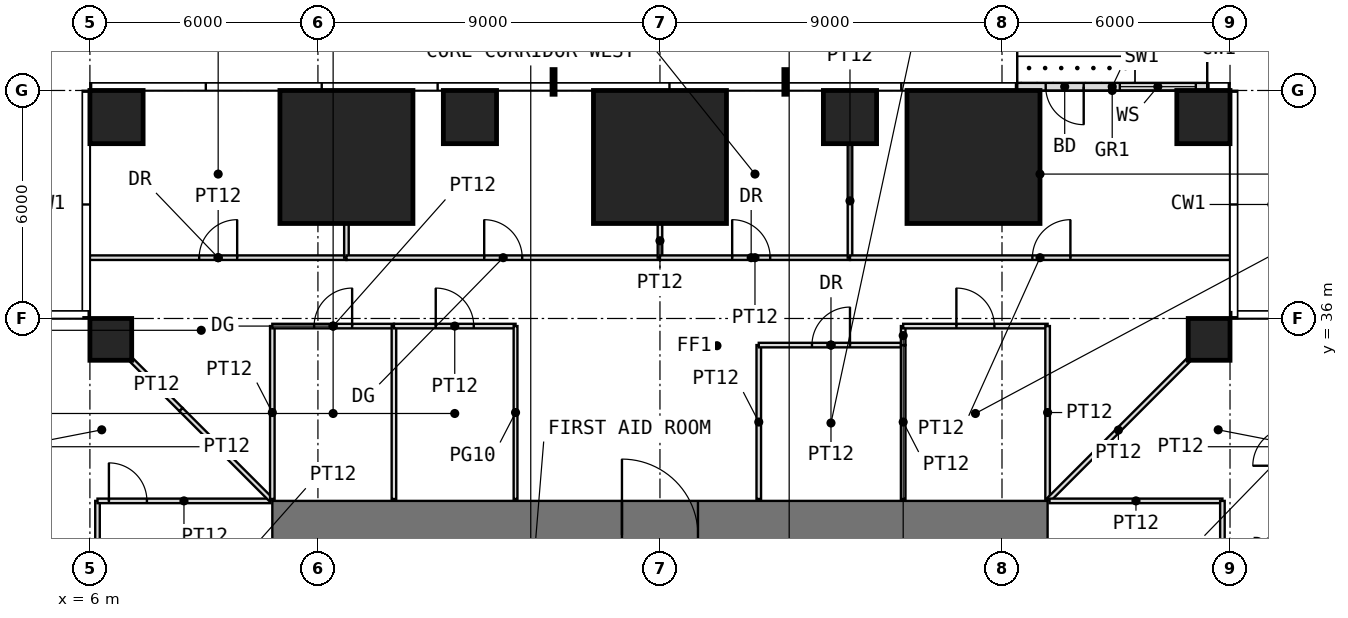
"""IFC4 building model, lengths in metres.
Left out: names, types, materials, properties, quantities, classifications, styles, units other than length and angle.
Written with IfcOpenShell. Run it as: python <this file> out.ifc"""

import sys

from ifc_helpers import new_model, si_unit, direction, frame, frame_2d, origin, origin_2d, place, context, subcontext, project, spatial, rectangle, extrude, element, fill, save


model = new_model("IFC4")
c1 = context("Model", 3, precision=1e-05, world=origin(), true_north=direction((0.0, 1.0)))
c2 = subcontext(c1, "Body", "Model", "MODEL_VIEW")
j1 = project(units=[si_unit("LENGTHUNIT", "METRE"), si_unit("PLANEANGLEUNIT", "RADIAN")], contexts=[c1])
p1 = place(None, origin())
s1 = spatial("IfcSite", under=j1, at=p1, CompositionType="ELEMENT")
p2 = place(p1, origin())
s2 = spatial("IfcBuilding", under=s1, at=p2, CompositionType="ELEMENT")
p3 = place(p2, frame((0.0, 0.0, 78.5)))
s3 = spatial("IfcBuildingStorey", under=s2, at=p3, CompositionType="ELEMENT", Elevation=78.5)
for number, where, z_axis, x_axis in (
    (1, (6.55, 35.45, 0.0), (0.0, 0.0, 1.0), (1.0, 0.0, 0.0)),
    (2, (35.45, 35.45, 0.0), (0.0, 0.0, 1.0), (1.0, 0.0, 0.0)),
):
    element("IfcColumn", number, at=place(p3, frame(where, z_axis=z_axis, x_axis=x_axis)), inside=s3, PredefinedType="COLUMN", context=c2, shape_type="SweptSolid", body=[
        extrude(rectangle(XDim=1.1, YDim=1.1, at=origin_2d()), origin(), (0.0, 0.0, 1.0), 4.0),
    ])
p4 = place(p3, frame((6.7, 41.3, 0.0), z_axis=(0.0, 0.0, 1.0), x_axis=(1.0, 0.0, 0.0)))
e3 = element("IfcColumn", 3, at=p4, inside=s3, PredefinedType="COLUMN", context=c2, shape_type="SweptSolid", body=[
    extrude(rectangle(XDim=1.4, YDim=1.4, at=origin_2d()), origin(), (0.0, 0.0, 1.0), 4.0),
])
p5 = place(p3, frame((12.75, 40.25, 0.0), z_axis=(0.0, 0.0, 1.0), x_axis=(1.0, 0.0, 0.0)))
e4 = element("IfcColumn", 4, at=p5, inside=s3, PredefinedType="COLUMN", context=c2, shape_type="SweptSolid", body=[
    extrude(rectangle(XDim=3.5, YDim=3.5, at=origin_2d()), origin(), (0.0, 0.0, 1.0), 4.0),
])
p6 = place(p3, frame((16.0, 41.3, 0.0), z_axis=(0.0, 0.0, 1.0), x_axis=(1.0, 0.0, 0.0)))
e5 = element("IfcColumn", 5, at=p6, inside=s3, PredefinedType="COLUMN", context=c2, shape_type="SweptSolid", body=[
    extrude(rectangle(XDim=1.4, YDim=1.4, at=origin_2d()), origin(), (0.0, 0.0, 1.0), 4.0),
])
p7 = place(p3, frame((21.0, 40.25, 0.0), z_axis=(0.0, 0.0, 1.0), x_axis=(1.0, 0.0, 0.0)))
e6 = element("IfcColumn", 6, at=p7, inside=s3, PredefinedType="COLUMN", context=c2, shape_type="SweptSolid", body=[
    extrude(rectangle(XDim=3.5, YDim=3.5, at=origin_2d()), origin(), (0.0, 0.0, 1.0), 4.0),
])
p8 = place(p3, frame((26.0, 41.3, 0.0), z_axis=(0.0, 0.0, 1.0), x_axis=(1.0, 0.0, 0.0)))
e7 = element("IfcColumn", 7, at=p8, inside=s3, PredefinedType="COLUMN", context=c2, shape_type="SweptSolid", body=[
    extrude(rectangle(XDim=1.4, YDim=1.4, at=origin_2d()), origin(), (0.0, 0.0, 1.0), 4.0),
])
p9 = place(p3, frame((29.25, 40.25, 0.0), z_axis=(0.0, 0.0, 1.0), x_axis=(1.0, 0.0, 0.0)))
e8 = element("IfcColumn", 8, at=p9, inside=s3, PredefinedType="COLUMN", context=c2, shape_type="SweptSolid", body=[
    extrude(rectangle(XDim=3.5, YDim=3.5, at=origin_2d()), origin(), (0.0, 0.0, 1.0), 4.0),
])
p10 = place(p3, frame((35.3, 41.3, 0.0), z_axis=(0.0, 0.0, 1.0), x_axis=(1.0, 0.0, 0.0)))
e9 = element("IfcColumn", 9, at=p10, inside=s3, PredefinedType="COLUMN", context=c2, shape_type="SweptSolid", body=[
    extrude(rectangle(XDim=1.4, YDim=1.4, at=origin_2d()), origin(), (0.0, 0.0, 1.0), 4.0),
])
p11 = place(p3, frame((35.4, 42.1, 0.0), z_axis=(0.0, 0.0, 1.0), x_axis=(-1.0, 0.0, 0.0)))
e10 = element("IfcWall", 10, at=p11, inside=s3, PredefinedType="USERDEFINED", context=c2, shape_type="SweptSolid", body=[
    extrude(rectangle(XDim=5.0, YDim=0.2, at=frame_2d((2.5, 0.0))), origin(), (0.0, 0.0, 1.0), 3.75),
])
p12 = place(p11, frame((3.25, 0.0, 0.0)))
e11 = element("IfcOpeningElement", 11, at=p12, cuts=e10, PredefinedType="OPENING", context=c2, shape_type="SweptSolid", body=[
    extrude(rectangle(XDim=1.0, YDim=2.4, at=frame_2d((0.5, 1.2))), frame((0.0, 0.11, 0.0), z_axis=(0.0, -1.0, 0.0), x_axis=(1.0, 0.0, 0.0)), (0.0, 0.0, 1.0), 0.22),
])
p13 = place(p11, frame((0.3, 0.0, 0.3)))
e12 = element("IfcOpeningElement", 12, at=p13, cuts=e10, PredefinedType="OPENING", context=c2, shape_type="SweptSolid", body=[
    extrude(rectangle(XDim=2.0, YDim=2.7, at=frame_2d((1.0, 1.35))), frame((0.0, 0.11, 0.0), z_axis=(0.0, -1.0, 0.0), x_axis=(1.0, 0.0, 0.0)), (0.0, 0.0, 1.0), 0.22),
])
p14 = place(p3, frame((10.8, 30.3, -0.05), z_axis=(0.0, 0.0, 1.0), x_axis=(1.0, 0.0, 0.0)))
e13 = element("IfcWall", 13, at=p14, inside=s3, PredefinedType="SHEAR", context=c2, shape_type="SweptSolid", body=[
    extrude(rectangle(XDim=20.4, YDim=1.8, at=frame_2d((10.2, 0.0))), origin(), (0.0, 0.0, 1.0), 4.0),
])
p15 = place(p14, frame((9.2, 0.0, 0.05)))
e14 = element("IfcOpeningElement", 14, at=p15, cuts=e13, PredefinedType="OPENING", context=c2, shape_type="SweptSolid", body=[
    extrude(rectangle(XDim=2.0, YDim=2.2, at=frame_2d((1.0, 1.1))), frame((0.0, 0.91, 0.0), z_axis=(0.0, -1.0, 0.0), x_axis=(1.0, 0.0, 0.0)), (0.0, 0.0, 1.0), 1.82),
])
p16 = place(p3, frame((6.0, 37.6, 0.0), z_axis=(0.0, 0.0, 1.0), x_axis=(1.0, 0.0, 0.0)))
e15 = element("IfcWall", 15, at=p16, inside=s3, PredefinedType="PARTITIONING", context=c2, shape_type="SweptSolid", body=[
    extrude(rectangle(XDim=6.75, YDim=0.12, at=frame_2d((3.375, 0.0))), origin(), (0.0, 0.0, 1.0), 3.75),
])
p17 = place(p16, frame((2.875, 0.0, 0.0)))
e16 = element("IfcOpeningElement", 16, at=p17, cuts=e15, PredefinedType="OPENING", context=c2, shape_type="SweptSolid", body=[
    extrude(rectangle(XDim=1.0, YDim=2.2, at=frame_2d((0.5, 1.1))), frame((0.0, 0.07, 0.0), z_axis=(0.0, -1.0, 0.0), x_axis=(1.0, 0.0, 0.0)), (0.0, 0.0, 1.0), 0.14),
])
p18 = place(p3, frame((6.2, 28.2, 0.0), z_axis=(0.0, 0.0, 1.0), x_axis=(0.0, 1.0, 0.0)))
e17 = element("IfcWall", 17, at=p18, inside=s3, PredefinedType="PARTITIONING", context=c2, shape_type="SweptSolid", body=[
    extrude(rectangle(XDim=3.0, YDim=0.12, at=frame_2d((1.5, 0.0))), origin(), (0.0, 0.0, 1.0), 3.75),
])
p19 = place(p3, frame((6.2, 31.2, 0.0), z_axis=(0.0, 0.0, 1.0), x_axis=(1.0, 0.0, 0.0)))
e18 = element("IfcWall", 18, at=p19, inside=s3, PredefinedType="PARTITIONING", context=c2, shape_type="SweptSolid", body=[
    extrude(rectangle(XDim=4.55, YDim=0.12, at=frame_2d((2.275, 0.0))), origin(), (0.0, 0.0, 1.0), 3.75),
])
p20 = place(p19, frame((0.3, 0.0, 0.0)))
e19 = element("IfcOpeningElement", 19, at=p20, cuts=e18, PredefinedType="OPENING", context=c2, shape_type="SweptSolid", body=[
    extrude(rectangle(XDim=1.0, YDim=2.4, at=frame_2d((0.5, 1.2))), frame((0.0, 0.07, 0.0), z_axis=(0.0, -1.0, 0.0), x_axis=(1.0, 0.0, 0.0)), (0.0, 0.0, 1.0), 0.14),
])
p21 = place(p3, frame((7.11, 34.89, 0.0), z_axis=(0.0, 0.0, 1.0), x_axis=(0.707106781187, -0.707106781187, 0.0)))
e20 = element("IfcWall", 20, at=p21, inside=s3, PredefinedType="PARTITIONING", context=c2, shape_type="SweptSolid", body=[
    extrude(rectangle(XDim=1.822, YDim=0.12, at=frame_2d((0.911, 0.0))), origin(), (0.0, 0.0, 1.0), 3.75),
])
p22 = place(p3, frame((8.398, 33.602, 0.0), z_axis=(0.0, 0.0, 1.0), x_axis=(0.707106781187, -0.707106781187, 0.0)))
e21 = element("IfcWall", 21, at=p22, inside=s3, PredefinedType="PARTITIONING", context=c2, shape_type="SweptSolid", body=[
    extrude(rectangle(XDim=3.346, YDim=0.12, at=frame_2d((1.673, 0.0))), origin(), (0.0, 0.0, 1.0), 3.75),
])
p23 = place(p3, frame((10.8, 31.25, 0.0), z_axis=(0.0, 0.0, 1.0), x_axis=(0.0, 1.0, 0.0)))
e22 = element("IfcWall", 22, at=p23, inside=s3, PredefinedType="PARTITIONING", context=c2, shape_type="SweptSolid", body=[
    extrude(rectangle(XDim=4.55, YDim=0.12, at=frame_2d((2.275, 0.0))), origin(), (0.0, 0.0, 1.0), 3.75),
])
p24 = place(p3, frame((10.8, 35.8, 0.0), z_axis=(0.0, 0.0, 1.0), x_axis=(1.0, 0.0, 0.0)))
e23 = element("IfcWall", 23, at=p24, inside=s3, PredefinedType="PARTITIONING", context=c2, shape_type="SweptSolid", body=[
    extrude(rectangle(XDim=3.2, YDim=0.12, at=frame_2d((1.6, 0.0))), origin(), (0.0, 0.0, 1.0), 3.75),
])
p25 = place(p24, frame((1.1, 0.0, 0.0)))
e24 = element("IfcOpeningElement", 24, at=p25, cuts=e23, PredefinedType="OPENING", context=c2, shape_type="SweptSolid", body=[
    extrude(rectangle(XDim=1.0, YDim=2.4, at=frame_2d((0.5, 1.2))), frame((0.0, 0.07, 0.0), z_axis=(0.0, -1.0, 0.0), x_axis=(1.0, 0.0, 0.0)), (0.0, 0.0, 1.0), 0.14),
])
p26 = place(p3, frame((12.75, 37.6, 0.0), z_axis=(0.0, 0.0, 1.0), x_axis=(0.0, 1.0, 0.0)))
e25 = element("IfcWall", 25, at=p26, inside=s3, PredefinedType="PARTITIONING", context=c2, shape_type="SweptSolid", body=[
    extrude(rectangle(XDim=0.89, YDim=0.12, at=frame_2d((0.445, 0.0))), origin(), (0.0, 0.0, 1.0), 3.75),
])
p27 = place(p3, frame((12.75, 37.6, 0.0), z_axis=(0.0, 0.0, 1.0), x_axis=(1.0, 0.0, 0.0)))
e26 = element("IfcWall", 26, at=p27, inside=s3, PredefinedType="PARTITIONING", context=c2, shape_type="SweptSolid", body=[
    extrude(rectangle(XDim=8.25, YDim=0.12, at=frame_2d((4.125, 0.0))), origin(), (0.0, 0.0, 1.0), 3.75),
])
p28 = place(p27, frame((3.625, 0.0, 0.0)))
e27 = element("IfcOpeningElement", 27, at=p28, cuts=e26, PredefinedType="OPENING", context=c2, shape_type="SweptSolid", body=[
    extrude(rectangle(XDim=1.0, YDim=2.4, at=frame_2d((0.5, 1.2))), frame((0.0, 0.07, 0.0), z_axis=(0.0, -1.0, 0.0), x_axis=(1.0, 0.0, 0.0)), (0.0, 0.0, 1.0), 0.14),
])
p29 = place(p3, frame((14.0, 31.25, 0.0), z_axis=(0.0, 0.0, 1.0), x_axis=(0.0, 1.0, 0.0)))
e28 = element("IfcWall", 28, at=p29, inside=s3, PredefinedType="PARTITIONING", context=c2, shape_type="SweptSolid", body=[
    extrude(rectangle(XDim=4.55, YDim=0.12, at=frame_2d((2.275, 0.0))), origin(), (0.0, 0.0, 1.0), 3.75),
])
p30 = place(p3, frame((14.0, 35.8, 0.0), z_axis=(0.0, 0.0, 1.0), x_axis=(1.0, 0.0, 0.0)))
e29 = element("IfcWall", 29, at=p30, inside=s3, PredefinedType="PARTITIONING", context=c2, shape_type="SweptSolid", body=[
    extrude(rectangle(XDim=3.2, YDim=0.12, at=frame_2d((1.6, 0.0))), origin(), (0.0, 0.0, 1.0), 3.75),
])
p31 = place(p30, frame((1.1, 0.0, 0.0)))
e30 = element("IfcOpeningElement", 30, at=p31, cuts=e29, PredefinedType="OPENING", context=c2, shape_type="SweptSolid", body=[
    extrude(rectangle(XDim=1.0, YDim=2.4, at=frame_2d((0.5, 1.2))), frame((0.0, 0.07, 0.0), z_axis=(0.0, -1.0, 0.0), x_axis=(1.0, 0.0, 0.0)), (0.0, 0.0, 1.0), 0.14),
])
p32 = place(p3, frame((17.2, 31.25, 0.0), z_axis=(0.0, 0.0, 1.0), x_axis=(0.0, 1.0, 0.0)))
e31 = element("IfcWall", 31, at=p32, inside=s3, PredefinedType="PARTITIONING", context=c2, shape_type="SweptSolid", body=[
    extrude(rectangle(XDim=4.55, YDim=0.1, at=frame_2d((2.275, 0.0))), origin(), (0.0, 0.0, 1.0), 3.75),
])
p33 = place(p3, frame((21.0, 37.6, 0.0), z_axis=(0.0, 0.0, 1.0), x_axis=(0.0, 1.0, 0.0)))
e32 = element("IfcWall", 32, at=p33, inside=s3, PredefinedType="PARTITIONING", context=c2, shape_type="SweptSolid", body=[
    extrude(rectangle(XDim=0.89, YDim=0.12, at=frame_2d((0.445, 0.0))), origin(), (0.0, 0.0, 1.0), 3.75),
])
p34 = place(p3, frame((21.0, 37.6, 0.0), z_axis=(0.0, 0.0, 1.0), x_axis=(1.0, 0.0, 0.0)))
e33 = element("IfcWall", 33, at=p34, inside=s3, PredefinedType="PARTITIONING", context=c2, shape_type="SweptSolid", body=[
    extrude(rectangle(XDim=5.0, YDim=0.12, at=frame_2d((2.5, 0.0))), origin(), (0.0, 0.0, 1.0), 3.75),
])
p35 = place(p34, frame((1.9, 0.0, 0.0)))
e34 = element("IfcOpeningElement", 34, at=p35, cuts=e33, PredefinedType="OPENING", context=c2, shape_type="SweptSolid", body=[
    extrude(rectangle(XDim=1.0, YDim=2.2, at=frame_2d((0.5, 1.1))), frame((0.0, 0.07, 0.0), z_axis=(0.0, -1.0, 0.0), x_axis=(1.0, 0.0, 0.0)), (0.0, 0.0, 1.0), 0.14),
])
p36 = place(p3, frame((23.6, 31.25, 0.0), z_axis=(0.0, 0.0, 1.0), x_axis=(0.0, 1.0, 0.0)))
e35 = element("IfcWall", 35, at=p36, inside=s3, PredefinedType="PARTITIONING", context=c2, shape_type="SweptSolid", body=[
    extrude(rectangle(XDim=4.05, YDim=0.12, at=frame_2d((2.025, 0.0))), origin(), (0.0, 0.0, 1.0), 3.75),
])
p37 = place(p3, frame((23.6, 35.3, 0.0), z_axis=(0.0, 0.0, 1.0), x_axis=(1.0, 0.0, 0.0)))
e36 = element("IfcWall", 36, at=p37, inside=s3, PredefinedType="PARTITIONING", context=c2, shape_type="SweptSolid", body=[
    extrude(rectangle(XDim=3.8, YDim=0.12, at=frame_2d((1.9, 0.0))), origin(), (0.0, 0.0, 1.0), 3.75),
])
p38 = place(p37, frame((1.4, 0.0, 0.0)))
e37 = element("IfcOpeningElement", 37, at=p38, cuts=e36, PredefinedType="OPENING", context=c2, shape_type="SweptSolid", body=[
    extrude(rectangle(XDim=1.0, YDim=2.2, at=frame_2d((0.5, 1.1))), frame((0.0, 0.07, 0.0), z_axis=(0.0, -1.0, 0.0), x_axis=(1.0, 0.0, 0.0)), (0.0, 0.0, 1.0), 0.14),
])
p39 = place(p3, frame((26.0, 37.6, 0.0), z_axis=(0.0, 0.0, 1.0), x_axis=(0.0, 1.0, 0.0)))
e38 = element("IfcWall", 38, at=p39, inside=s3, PredefinedType="PARTITIONING", context=c2, shape_type="SweptSolid", body=[
    extrude(rectangle(XDim=2.99, YDim=0.12, at=frame_2d((1.495, 0.0))), origin(), (0.0, 0.0, 1.0), 3.75),
])
p40 = place(p3, frame((26.0, 37.6, 0.0), z_axis=(0.0, 0.0, 1.0), x_axis=(1.0, 0.0, 0.0)))
e39 = element("IfcWall", 39, at=p40, inside=s3, PredefinedType="PARTITIONING", context=c2, shape_type="SweptSolid", body=[
    extrude(rectangle(XDim=10.0, YDim=0.12, at=frame_2d((5.0, 0.0))), origin(), (0.0, 0.0, 1.0), 3.75),
])
p41 = place(p40, frame((4.8, 0.0, 0.0)))
e40 = element("IfcOpeningElement", 40, at=p41, cuts=e39, PredefinedType="OPENING", context=c2, shape_type="SweptSolid", body=[
    extrude(rectangle(XDim=1.0, YDim=2.4, at=frame_2d((0.5, 1.2))), frame((0.0, 0.07, 0.0), z_axis=(0.0, -1.0, 0.0), x_axis=(1.0, 0.0, 0.0)), (0.0, 0.0, 1.0), 0.14),
])
p42 = place(p3, frame((27.4, 31.25, 0.0), z_axis=(0.0, 0.0, 1.0), x_axis=(0.0, 1.0, 0.0)))
e41 = element("IfcWall", 41, at=p42, inside=s3, PredefinedType="PARTITIONING", context=c2, shape_type="SweptSolid", body=[
    extrude(rectangle(XDim=4.05, YDim=0.12, at=frame_2d((2.025, 0.0))), origin(), (0.0, 0.0, 1.0), 3.75),
])
p43 = place(p3, frame((27.4, 35.3, 0.0), z_axis=(0.0, 0.0, 1.0), x_axis=(0.0, 1.0, 0.0)))
e42 = element("IfcWall", 42, at=p43, inside=s3, PredefinedType="PARTITIONING", context=c2, shape_type="SweptSolid", body=[
    extrude(rectangle(XDim=0.5, YDim=0.12, at=frame_2d((0.25, 0.0))), origin(), (0.0, 0.0, 1.0), 3.75),
])
p44 = place(p3, frame((27.4, 35.8, 0.0), z_axis=(0.0, 0.0, 1.0), x_axis=(1.0, 0.0, 0.0)))
e43 = element("IfcWall", 43, at=p44, inside=s3, PredefinedType="PARTITIONING", context=c2, shape_type="SweptSolid", body=[
    extrude(rectangle(XDim=3.8, YDim=0.12, at=frame_2d((1.9, 0.0))), origin(), (0.0, 0.0, 1.0), 3.75),
])
p45 = place(p44, frame((1.4, 0.0, 0.0)))
e44 = element("IfcOpeningElement", 44, at=p45, cuts=e43, PredefinedType="OPENING", context=c2, shape_type="SweptSolid", body=[
    extrude(rectangle(XDim=1.0, YDim=2.4, at=frame_2d((0.5, 1.2))), frame((0.0, 0.07, 0.0), z_axis=(0.0, -1.0, 0.0), x_axis=(1.0, 0.0, 0.0)), (0.0, 0.0, 1.0), 0.14),
])
p46 = place(p3, frame((31.2, 31.25, 0.0), z_axis=(0.0, 0.0, 1.0), x_axis=(0.0, 1.0, 0.0)))
e45 = element("IfcWall", 45, at=p46, inside=s3, PredefinedType="PARTITIONING", context=c2, shape_type="SweptSolid", body=[
    extrude(rectangle(XDim=4.55, YDim=0.12, at=frame_2d((2.275, 0.0))), origin(), (0.0, 0.0, 1.0), 3.75),
])
p47 = place(p3, frame((31.235, 31.235, 0.0), z_axis=(0.0, 0.0, 1.0), x_axis=(0.707106781187, 0.707106781187, 0.0)))
e46 = element("IfcWall", 46, at=p47, inside=s3, PredefinedType="PARTITIONING", context=c2, shape_type="SweptSolid", body=[
    extrude(rectangle(XDim=5.168, YDim=0.12, at=frame_2d((2.584, 0.0))), origin(), (0.0, 0.0, 1.0), 3.75),
])
p48 = place(p3, frame((31.25, 31.2, 0.0), z_axis=(0.0, 0.0, 1.0), x_axis=(1.0, 0.0, 0.0)))
e47 = element("IfcWall", 47, at=p48, inside=s3, PredefinedType="PARTITIONING", context=c2, shape_type="SweptSolid", body=[
    extrude(rectangle(XDim=4.55, YDim=0.12, at=frame_2d((2.275, 0.0))), origin(), (0.0, 0.0, 1.0), 3.75),
])
p49 = place(p3, frame((35.8, 25.0, 0.0), z_axis=(0.0, 0.0, 1.0), x_axis=(0.0, 1.0, 0.0)))
e48 = element("IfcWall", 48, at=p49, inside=s3, PredefinedType="PARTITIONING", context=c2, shape_type="SweptSolid", body=[
    extrude(rectangle(XDim=6.2, YDim=0.12, at=frame_2d((3.1, 0.0))), origin(), (0.0, 0.0, 1.0), 3.75),
])
p50 = place(p49, frame((2.6, 0.0, 0.0)))
e49 = element("IfcOpeningElement", 49, at=p50, cuts=e48, PredefinedType="OPENING", context=c2, shape_type="SweptSolid", body=[
    extrude(rectangle(XDim=1.0, YDim=2.4, at=frame_2d((0.5, 1.2))), frame((0.0, 0.07, 0.0), z_axis=(0.0, -1.0, 0.0), x_axis=(1.0, 0.0, 0.0)), (0.0, 0.0, 1.0), 0.14),
])
p51 = place(p12, origin())
e50 = element("IfcDoor", 50, at=p51, inside=s3, OperationType="SINGLE_SWING_LEFT", PredefinedType="DOOR", context=c2, shape_type="SweptSolid", body=[
    extrude(rectangle(XDim=1.0, YDim=2.4, at=frame_2d((0.5, 1.2))), frame((0.0, 0.025, 0.0), z_axis=(0.0, -1.0, 0.0), x_axis=(1.0, 0.0, 0.0)), (0.0, 0.0, 1.0), 0.05),
])
fill(e11, e50)
p52 = place(p13, origin())
e51 = element("IfcWindow", 51, at=p52, inside=s3, PartitioningType="SINGLE_PANEL", PredefinedType="WINDOW", context=c2, shape_type="SweptSolid", body=[
    extrude(rectangle(XDim=2.0, YDim=2.7, at=frame_2d((1.0, 1.35))), frame((0.0, 0.03, 0.0), z_axis=(0.0, -1.0, 0.0), x_axis=(1.0, 0.0, 0.0)), (0.0, 0.0, 1.0), 0.06),
])
fill(e12, e51)
p53 = place(p15, origin())
e52 = element("IfcDoor", 52, at=p53, inside=s3, OperationType="DOUBLE_DOOR_SINGLE_SWING", PredefinedType="DOOR", context=c2, shape_type="SweptSolid", body=[
    extrude(rectangle(XDim=2.0, YDim=2.2, at=frame_2d((1.0, 1.1))), frame((0.0, 0.025, 0.0), z_axis=(0.0, -1.0, 0.0), x_axis=(1.0, 0.0, 0.0)), (0.0, 0.0, 1.0), 0.05),
])
fill(e14, e52)
p54 = place(p25, origin())
e53 = element("IfcDoor", 53, at=p54, inside=s3, OperationType="SINGLE_SWING_RIGHT", PredefinedType="DOOR", context=c2, shape_type="SweptSolid", body=[
    extrude(rectangle(XDim=1.0, YDim=2.4, at=frame_2d((0.5, 1.2))), frame((0.0, 0.025, 0.0), z_axis=(0.0, -1.0, 0.0), x_axis=(1.0, 0.0, 0.0)), (0.0, 0.0, 1.0), 0.05),
])
fill(e24, e53)
p55 = place(p31, origin())
e54 = element("IfcDoor", 54, at=p55, inside=s3, OperationType="SINGLE_SWING_LEFT", PredefinedType="DOOR", context=c2, shape_type="SweptSolid", body=[
    extrude(rectangle(XDim=1.0, YDim=2.4, at=frame_2d((0.5, 1.2))), frame((0.0, 0.025, 0.0), z_axis=(0.0, -1.0, 0.0), x_axis=(1.0, 0.0, 0.0)), (0.0, 0.0, 1.0), 0.05),
])
fill(e30, e54)
p56 = place(p38, origin())
e55 = element("IfcDoor", 55, at=p56, inside=s3, OperationType="SINGLE_SWING_RIGHT", PredefinedType="DOOR", context=c2, shape_type="SweptSolid", body=[
    extrude(rectangle(XDim=1.0, YDim=2.2, at=frame_2d((0.5, 1.1))), frame((0.0, 0.025, 0.0), z_axis=(0.0, -1.0, 0.0), x_axis=(1.0, 0.0, 0.0)), (0.0, 0.0, 1.0), 0.05),
])
fill(e37, e55)
p57 = place(p45, origin())
e56 = element("IfcDoor", 56, at=p57, inside=s3, OperationType="SINGLE_SWING_LEFT", PredefinedType="DOOR", context=c2, shape_type="SweptSolid", body=[
    extrude(rectangle(XDim=1.0, YDim=2.4, at=frame_2d((0.5, 1.2))), frame((0.0, 0.025, 0.0), z_axis=(0.0, -1.0, 0.0), x_axis=(1.0, 0.0, 0.0)), (0.0, 0.0, 1.0), 0.05),
])
fill(e44, e56)
p58 = place(p17, origin())
e57 = element("IfcDoor", 57, at=p58, inside=s3, OperationType="SINGLE_SWING_RIGHT", PredefinedType="DOOR", context=c2, shape_type="SweptSolid", body=[
    extrude(rectangle(XDim=1.0, YDim=2.2, at=frame_2d((0.5, 1.1))), frame((0.0, 0.025, 0.0), z_axis=(0.0, -1.0, 0.0), x_axis=(1.0, 0.0, 0.0)), (0.0, 0.0, 1.0), 0.05),
])
fill(e16, e57)
p59 = place(p35, origin())
e58 = element("IfcDoor", 58, at=p59, inside=s3, OperationType="SINGLE_SWING_LEFT", PredefinedType="DOOR", context=c2, shape_type="SweptSolid", body=[
    extrude(rectangle(XDim=1.0, YDim=2.2, at=frame_2d((0.5, 1.1))), frame((0.0, 0.025, 0.0), z_axis=(0.0, -1.0, 0.0), x_axis=(1.0, 0.0, 0.0)), (0.0, 0.0, 1.0), 0.05),
])
fill(e34, e58)
p60 = place(p28, origin())
e59 = element("IfcDoor", 59, at=p60, inside=s3, OperationType="SINGLE_SWING_LEFT", PredefinedType="DOOR", context=c2, shape_type="SweptSolid", body=[
    extrude(rectangle(XDim=1.0, YDim=2.4, at=frame_2d((0.5, 1.2))), frame((0.0, 0.025, 0.0), z_axis=(0.0, -1.0, 0.0), x_axis=(1.0, 0.0, 0.0)), (0.0, 0.0, 1.0), 0.05),
])
fill(e27, e59)
p61 = place(p41, origin())
e60 = element("IfcDoor", 60, at=p61, inside=s3, OperationType="SINGLE_SWING_RIGHT", PredefinedType="DOOR", context=c2, shape_type="SweptSolid", body=[
    extrude(rectangle(XDim=1.0, YDim=2.4, at=frame_2d((0.5, 1.2))), frame((0.0, 0.025, 0.0), z_axis=(0.0, -1.0, 0.0), x_axis=(1.0, 0.0, 0.0)), (0.0, 0.0, 1.0), 0.05),
])
fill(e40, e60)
p62 = place(p20, origin())
e61 = element("IfcDoor", 61, at=p62, inside=s3, OperationType="SINGLE_SWING_LEFT", PredefinedType="DOOR", context=c2, shape_type="SweptSolid", body=[
    extrude(rectangle(XDim=1.0, YDim=2.4, at=frame_2d((0.5, 1.2))), frame((0.0, 0.025, 0.0), z_axis=(0.0, -1.0, 0.0), x_axis=(1.0, 0.0, 0.0)), (0.0, 0.0, 1.0), 0.05),
])
fill(e19, e61)
save(model, sys.argv[1])
